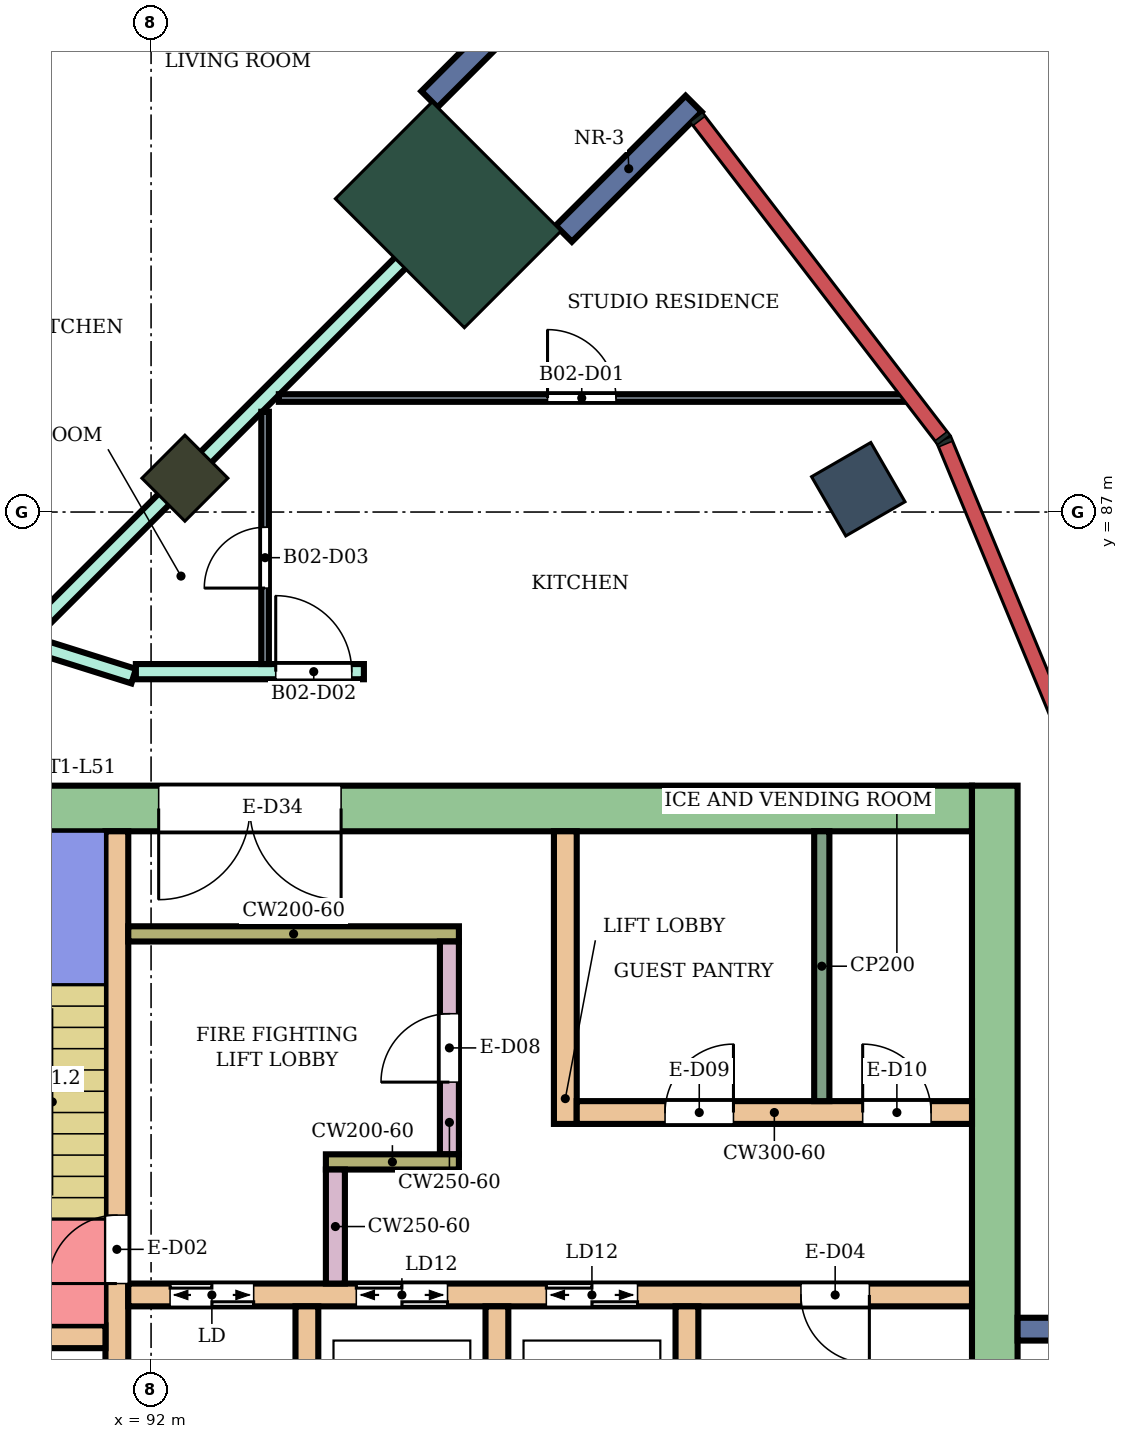
"""IFC4 building model, lengths in metres.
Left out: names, types, materials, properties, quantities, classifications, styles, units other than length and angle.
Written with IfcOpenShell. Run it as: python <this file> out.ifc"""

import sys

from ifc_helpers import new_model, si_unit, direction, frame, frame_2d, origin, origin_2d, place, context, subcontext, project, spatial, rectangle, extrude, element, fill, save


model = new_model("IFC4")
c1 = context("Model", 3, precision=1e-05, world=origin(), true_north=direction((0.0, 1.0)))
c2 = subcontext(c1, "Body", "Model", "MODEL_VIEW")
j1 = project(units=[si_unit("LENGTHUNIT", "METRE"), si_unit("PLANEANGLEUNIT", "RADIAN")], contexts=[c1])
p1 = place(None, origin())
s1 = spatial("IfcSite", under=j1, at=p1, CompositionType="ELEMENT")
p2 = place(p1, origin())
s2 = spatial("IfcBuilding", under=s1, at=p2, CompositionType="ELEMENT")
p3 = place(p2, frame((0.0, 0.0, 220.9)))
s3 = spatial("IfcBuildingStorey", under=s2, at=p3, CompositionType="ELEMENT", Elevation=220.9)
p4 = place(p3, frame((101.304, 87.3, 0.0), z_axis=(0.0, 0.0, 1.0), x_axis=(0.866025403784, 0.5, 0.0)))
e1 = element("IfcColumn", 1, at=p4, inside=s3, PredefinedType="COLUMN", context=c2, shape_type="SweptSolid", body=[
    extrude(rectangle(XDim=0.9, YDim=0.9, at=origin_2d()), origin(), (0.0, 0.0, 1.0), 4.2),
])
p5 = place(p3, frame((92.445, 87.445, 0.0), z_axis=(0.0, 0.0, 1.0), x_axis=(0.707106781187, 0.707106781187, 0.0)))
e2 = element("IfcColumn", 2, at=p5, inside=s3, PredefinedType="COLUMN", context=c2, shape_type="SweptSolid", body=[
    extrude(rectangle(XDim=0.8, YDim=0.8, at=origin_2d()), origin(), (0.0, 0.0, 1.0), 4.2),
])
p6 = place(p3, frame((95.91, 90.91, 0.0), z_axis=(0.0, 0.0, 1.0), x_axis=(0.707106781187, 0.707106781187, 0.0)))
e3 = element("IfcColumn", 3, at=p6, inside=s3, PredefinedType="COLUMN", context=c2, shape_type="SweptSolid", body=[
    extrude(rectangle(XDim=1.8, YDim=2.4, at=origin_2d()), origin(), (0.0, 0.0, 1.0), 4.2),
])
p7 = place(p3, frame((87.9, 83.1, 0.0), z_axis=(0.0, 0.0, 1.0), x_axis=(1.0, 0.0, 0.0)))
e4 = element("IfcWall", 4, at=p7, inside=s3, PredefinedType="SHEAR", context=c2, shape_type="SweptSolid", body=[
    extrude(rectangle(XDim=14.9, YDim=0.6, at=frame_2d((7.45, 0.0))), origin(), (0.0, 0.0, 1.0), 3.88),
])
p8 = place(p7, frame((4.2, 0.0, 0.0)))
e5 = element("IfcOpeningElement", 5, at=p8, cuts=e4, PredefinedType="OPENING", context=c2, shape_type="SweptSolid", body=[
    extrude(rectangle(XDim=2.4, YDim=2.4, at=frame_2d((1.2, 1.2))), frame((0.0, 0.31, 0.0), z_axis=(0.0, -1.0, 0.0), x_axis=(1.0, 0.0, 0.0)), (0.0, 0.0, 1.0), 0.62),
])
p9 = place(p3, frame((103.1, 66.6, 0.0), z_axis=(0.0, 0.0, 1.0), x_axis=(0.0, 1.0, 0.0)))
e6 = element("IfcWall", 6, at=p9, inside=s3, PredefinedType="SHEAR", context=c2, shape_type="SweptSolid", body=[
    extrude(rectangle(XDim=16.8, YDim=0.6, at=frame_2d((8.4, 0.0))), origin(), (0.0, 0.0, 1.0), 3.88),
])
p10 = place(p3, frame((91.55, 75.0, 0.0), z_axis=(0.0, 0.0, 1.0), x_axis=(0.0, 1.0, 0.0)))
e7 = element("IfcWall", 7, at=p10, inside=s3, PredefinedType="SHEAR", context=c2, shape_type="SweptSolid", body=[
    extrude(rectangle(XDim=7.8, YDim=0.3, at=frame_2d((3.9, 0.0))), origin(), (0.0, 0.0, 1.0), 3.88),
])
p11 = place(p10, frame((1.85, 0.0, 0.0)))
e8 = element("IfcOpeningElement", 8, at=p11, cuts=e7, PredefinedType="OPENING", context=c2, shape_type="SweptSolid", body=[
    extrude(rectangle(XDim=0.9, YDim=2.1, at=frame_2d((0.45, 1.05))), frame((0.0, 0.16, 0.0), z_axis=(0.0, -1.0, 0.0), x_axis=(1.0, 0.0, 0.0)), (0.0, 0.0, 1.0), 0.32),
])
p12 = place(p3, frame((88.35, 76.15, 0.0), z_axis=(0.0, 0.0, 1.0), x_axis=(1.0, 0.0, 0.0)))
e9 = element("IfcWall", 9, at=p12, inside=s3, PredefinedType="SHEAR", context=c2, shape_type="SweptSolid", body=[
    extrude(rectangle(XDim=3.05, YDim=0.3, at=frame_2d((1.525, 0.0))), origin(), (0.0, 0.0, 1.0), 3.88),
])
p13 = place(p12, frame((1.1, 0.0, 0.0)))
e10 = element("IfcOpeningElement", 10, at=p13, cuts=e9, PredefinedType="OPENING", context=c2, shape_type="SweptSolid", body=[
    extrude(rectangle(XDim=0.7, YDim=2.0, at=frame_2d((0.35, 1.0))), frame((0.0, 0.16, 0.0), z_axis=(0.0, -1.0, 0.0), x_axis=(1.0, 0.0, 0.0)), (0.0, 0.0, 1.0), 0.32),
])
p14 = place(p3, frame((91.7, 76.7, 0.0), z_axis=(0.0, 0.0, 1.0), x_axis=(1.0, 0.0, 0.0)))
e11 = element("IfcWall", 11, at=p14, inside=s3, PredefinedType="SHEAR", context=c2, shape_type="SweptSolid", body=[
    extrude(rectangle(XDim=11.1, YDim=0.3, at=frame_2d((5.55, 0.0))), origin(), (0.0, 0.0, 1.0), 3.88),
])
p15 = place(p14, frame((0.55, 0.0, 0.0)))
e12 = element("IfcOpeningElement", 12, at=p15, cuts=e11, PredefinedType="OPENING", context=c2, shape_type="SweptSolid", body=[
    extrude(rectangle(XDim=1.1, YDim=2.1, at=frame_2d((0.55, 1.05))), frame((0.0, 0.16, 0.0), z_axis=(0.0, -1.0, 0.0), x_axis=(1.0, 0.0, 0.0)), (0.0, 0.0, 1.0), 0.32),
])
p16 = place(p14, frame((3.0, 0.0, 0.0)))
e13 = element("IfcOpeningElement", 13, at=p16, cuts=e11, PredefinedType="OPENING", context=c2, shape_type="SweptSolid", body=[
    extrude(rectangle(XDim=1.2, YDim=2.1, at=frame_2d((0.6, 1.05))), frame((0.0, 0.16, 0.0), z_axis=(0.0, -1.0, 0.0), x_axis=(1.0, 0.0, 0.0)), (0.0, 0.0, 1.0), 0.32),
])
p17 = place(p14, frame((5.5, 0.0, 0.0)))
e14 = element("IfcOpeningElement", 14, at=p17, cuts=e11, PredefinedType="OPENING", context=c2, shape_type="SweptSolid", body=[
    extrude(rectangle(XDim=1.2, YDim=2.1, at=frame_2d((0.6, 1.05))), frame((0.0, 0.16, 0.0), z_axis=(0.0, -1.0, 0.0), x_axis=(1.0, 0.0, 0.0)), (0.0, 0.0, 1.0), 0.32),
])
p18 = place(p14, frame((8.85, 0.0, 0.0)))
e15 = element("IfcOpeningElement", 15, at=p18, cuts=e11, PredefinedType="OPENING", context=c2, shape_type="SweptSolid", body=[
    extrude(rectangle(XDim=0.9, YDim=2.1, at=frame_2d((0.45, 1.05))), frame((0.0, 0.16, 0.0), z_axis=(0.0, -1.0, 0.0), x_axis=(1.0, 0.0, 0.0)), (0.0, 0.0, 1.0), 0.32),
])
for number, where, z_axis, x_axis in (
    (16, (94.05, 74.0, 0.0), (0.0, 0.0, 1.0), (0.0, 1.0, 0.0)),
    (17, (96.55, 74.0, 0.0), (0.0, 0.0, 1.0), (0.0, 1.0, 0.0)),
    (18, (99.05, 74.0, 0.0), (0.0, 0.0, 1.0), (0.0, 1.0, 0.0)),
):
    element("IfcWall", number, at=place(p3, frame(where, z_axis=z_axis, x_axis=x_axis)), inside=s3, PredefinedType="SHEAR", context=c2, shape_type="SweptSolid", body=[
        extrude(rectangle(XDim=2.55, YDim=0.3, at=frame_2d((1.275, 0.0))), origin(), (0.0, 0.0, 1.0), 3.88),
    ])
p19 = place(p3, frame((91.7, 81.45, 0.0), z_axis=(0.0, 0.0, 1.0), x_axis=(1.0, 0.0, 0.0)))
e19 = element("IfcWall", 19, at=p19, inside=s3, PredefinedType="SHEAR", context=c2, shape_type="SweptSolid", body=[
    extrude(rectangle(XDim=4.35, YDim=0.2, at=frame_2d((2.175, 0.0))), origin(), (0.0, 0.0, 1.0), 3.88),
])
p20 = place(p3, frame((95.925, 78.55, 0.0), z_axis=(0.0, 0.0, 1.0), x_axis=(0.0, 1.0, 0.0)))
e20 = element("IfcWall", 20, at=p20, inside=s3, PredefinedType="SHEAR", context=c2, shape_type="SweptSolid", body=[
    extrude(rectangle(XDim=2.8, YDim=0.25, at=frame_2d((1.4, 0.0))), origin(), (0.0, 0.0, 1.0), 3.88),
])
p21 = place(p20, frame((0.95, 0.0, 0.0)))
e21 = element("IfcOpeningElement", 21, at=p21, cuts=e20, PredefinedType="OPENING", context=c2, shape_type="SweptSolid", body=[
    extrude(rectangle(XDim=0.9, YDim=2.1, at=frame_2d((0.45, 1.05))), frame((0.0, 0.135, 0.0), z_axis=(0.0, -1.0, 0.0), x_axis=(1.0, 0.0, 0.0)), (0.0, 0.0, 1.0), 0.27),
])
p22 = place(p3, frame((94.3, 78.45, 0.0), z_axis=(0.0, 0.0, 1.0), x_axis=(1.0, 0.0, 0.0)))
e22 = element("IfcWall", 22, at=p22, inside=s3, PredefinedType="SHEAR", context=c2, shape_type="SweptSolid", body=[
    extrude(rectangle(XDim=1.75, YDim=0.2, at=frame_2d((0.875, 0.0))), origin(), (0.0, 0.0, 1.0), 3.88),
])
p23 = place(p3, frame((94.425, 76.85, 0.0), z_axis=(0.0, 0.0, 1.0), x_axis=(0.0, 1.0, 0.0)))
e23 = element("IfcWall", 23, at=p23, inside=s3, PredefinedType="SHEAR", context=c2, shape_type="SweptSolid", body=[
    extrude(rectangle(XDim=1.5, YDim=0.25, at=frame_2d((0.75, 0.0))), origin(), (0.0, 0.0, 1.0), 3.88),
])
p24 = place(p3, frame((97.45, 78.95, 0.0), z_axis=(0.0, 0.0, 1.0), x_axis=(0.0, 1.0, 0.0)))
e24 = element("IfcWall", 24, at=p24, inside=s3, PredefinedType="SHEAR", context=c2, shape_type="SweptSolid", body=[
    extrude(rectangle(XDim=3.85, YDim=0.3, at=frame_2d((1.925, 0.0))), origin(), (0.0, 0.0, 1.0), 3.88),
])
p25 = place(p3, frame((97.6, 79.1, 0.0), z_axis=(0.0, 0.0, 1.0), x_axis=(1.0, 0.0, 0.0)))
e25 = element("IfcWall", 25, at=p25, inside=s3, PredefinedType="SHEAR", context=c2, shape_type="SweptSolid", body=[
    extrude(rectangle(XDim=5.2, YDim=0.3, at=frame_2d((2.6, 0.0))), origin(), (0.0, 0.0, 1.0), 3.88),
])
p26 = place(p25, frame((1.162, 0.0, 0.0)))
e26 = element("IfcOpeningElement", 26, at=p26, cuts=e25, PredefinedType="OPENING", context=c2, shape_type="SweptSolid", body=[
    extrude(rectangle(XDim=0.9, YDim=2.1, at=frame_2d((0.45, 1.05))), frame((0.0, 0.16, 0.0), z_axis=(0.0, -1.0, 0.0), x_axis=(1.0, 0.0, 0.0)), (0.0, 0.0, 1.0), 0.32),
])
p27 = place(p25, frame((3.762, 0.0, 0.0)))
e27 = element("IfcOpeningElement", 27, at=p27, cuts=e25, PredefinedType="OPENING", context=c2, shape_type="SweptSolid", body=[
    extrude(rectangle(XDim=0.9, YDim=2.1, at=frame_2d((0.45, 1.05))), frame((0.0, 0.16, 0.0), z_axis=(0.0, -1.0, 0.0), x_axis=(1.0, 0.0, 0.0)), (0.0, 0.0, 1.0), 0.32),
])
for number, where, z_axis, x_axis in (
    (28, (103.4, 76.25, 0.0), (0.0, 0.0, 1.0), (1.0, 0.0, 0.0)),
    (29, (97.43, 90.662, 0.0), (0.0, 0.0, 1.0), (0.707, 0.707, 0.0)),
    (30, (95.662, 92.43, 0.0), (0.0, 0.0, 1.0), (0.707, 0.707, 0.0)),
):
    element("IfcWall", number, at=place(p3, frame(where, z_axis=z_axis, x_axis=x_axis)), inside=s3, PredefinedType="NOTDEFINED", context=c2, shape_type="SweptSolid", body=[
        extrude(rectangle(XDim=2.416, YDim=0.3, at=frame_2d((1.208, 0.0))), origin(), (0.0, 0.0, 1.0), 4.2),
    ])
p28 = place(p3, frame((86.313, 86.554, 0.0), z_axis=(0.0, 0.0, 1.0), x_axis=(0.954081217458, -0.299548043717, 0.0)))
e31 = element("IfcWall", 31, at=p28, inside=s3, PredefinedType="PARTITIONING", context=c2, shape_type="SweptSolid", body=[
    extrude(rectangle(XDim=5.721, YDim=0.2, at=frame_2d((2.86, 0.0))), origin(), (0.0, 0.0, 1.0), 3.75),
])
p29 = place(p28, frame((0.848, 0.0, 0.0)))
e32 = element("IfcOpeningElement", 32, at=p29, cuts=e31, PredefinedType="OPENING", context=c2, shape_type="SweptSolid", body=[
    extrude(rectangle(XDim=1.0, YDim=2.1, at=frame_2d((0.5, 1.05))), frame((0.0, 0.11, 0.0), z_axis=(0.0, -1.0, 0.0), x_axis=(1.0, 0.0, 0.0)), (0.0, 0.0, 1.0), 0.22),
])
p30 = place(p3, frame((90.416, 85.416, 0.0), z_axis=(0.0, 0.0, 1.0), x_axis=(0.707222076599, 0.706991466971, 0.0)))
e33 = element("IfcWall", 33, at=p30, inside=s3, PredefinedType="PARTITIONING", context=c2, shape_type="SweptSolid", body=[
    extrude(rectangle(XDim=8.469, YDim=0.2, at=frame_2d((4.235, 0.0))), origin(), (0.0, 0.0, 1.0), 3.75),
])
p31 = place(p3, frame((91.8, 84.9, 0.0), z_axis=(0.0, 0.0, 1.0), x_axis=(1.0, 0.0, 0.0)))
e34 = element("IfcWall", 34, at=p31, inside=s3, PredefinedType="PARTITIONING", context=c2, shape_type="SweptSolid", body=[
    extrude(rectangle(XDim=3.0, YDim=0.2, at=frame_2d((1.5, 0.0))), origin(), (0.0, 0.0, 1.0), 3.75),
])
p32 = place(p31, frame((1.84, 0.0, 0.0)))
e35 = element("IfcOpeningElement", 35, at=p32, cuts=e34, PredefinedType="OPENING", context=c2, shape_type="SweptSolid", body=[
    extrude(rectangle(XDim=1.0, YDim=2.1, at=frame_2d((0.5, 1.05))), frame((0.0, 0.11, 0.0), z_axis=(0.0, -1.0, 0.0), x_axis=(1.0, 0.0, 0.0)), (0.0, 0.0, 1.0), 0.22),
])
p33 = place(p3, frame((86.671, 86.554, 0.0), z_axis=(0.0, 0.0, 1.0), x_axis=(0.500104188531, 0.865965242151, 0.0)))
e36 = element("IfcWall", 36, at=p33, inside=s3, PredefinedType="PARTITIONING", context=c2, shape_type="SweptSolid", body=[
    extrude(rectangle(XDim=12.456, YDim=0.1, at=frame_2d((6.228, 0.0))), origin(), (0.0, 0.0, 1.0), 3.75),
])
p34 = place(p33, frame((9.111, 0.0, 0.0)))
e37 = element("IfcOpeningElement", 37, at=p34, cuts=e36, PredefinedType="OPENING", context=c2, shape_type="SweptSolid", body=[
    extrude(rectangle(XDim=0.9, YDim=2.1, at=frame_2d((0.45, 1.05))), frame((0.0, 0.06, 0.0), z_axis=(0.0, -1.0, 0.0), x_axis=(1.0, 0.0, 0.0)), (0.0, 0.0, 1.0), 0.12),
])
p35 = place(p33, frame((2.462, 0.0, 0.0)))
e38 = element("IfcOpeningElement", 38, at=p35, cuts=e36, PredefinedType="OPENING", context=c2, shape_type="SweptSolid", body=[
    extrude(rectangle(XDim=0.8, YDim=2.1, at=frame_2d((0.4, 1.05))), frame((0.0, 0.06, 0.0), z_axis=(0.0, -1.0, 0.0), x_axis=(1.0, 0.0, 0.0)), (0.0, 0.0, 1.0), 0.12),
])
p36 = place(p3, frame((93.5, 85.0, 0.0), z_axis=(0.0, 0.0, 1.0), x_axis=(0.0, 1.0, 0.0)))
e39 = element("IfcWall", 39, at=p36, inside=s3, PredefinedType="PARTITIONING", context=c2, shape_type="SweptSolid", body=[
    extrude(rectangle(XDim=3.319, YDim=0.1, at=frame_2d((1.66, 0.0))), origin(), (0.0, 0.0, 1.0), 3.75),
])
p37 = place(p36, frame((1.0, 0.0, 0.0)))
e40 = element("IfcOpeningElement", 40, at=p37, cuts=e39, PredefinedType="OPENING", context=c2, shape_type="SweptSolid", body=[
    extrude(rectangle(XDim=0.8, YDim=2.1, at=frame_2d((0.4, 1.05))), frame((0.0, 0.06, 0.0), z_axis=(0.0, -1.0, 0.0), x_axis=(1.0, 0.0, 0.0)), (0.0, 0.0, 1.0), 0.12),
])
p38 = place(p3, frame((93.681, 88.5, 0.0), z_axis=(0.0, 0.0, 1.0), x_axis=(1.0, 0.0, 0.0)))
e41 = element("IfcWall", 41, at=p38, inside=s3, PredefinedType="PARTITIONING", context=c2, shape_type="SweptSolid", body=[
    extrude(rectangle(XDim=8.247, YDim=0.1, at=frame_2d((4.124, 0.0))), origin(), (0.0, 0.0, 1.0), 3.75),
])
p39 = place(p38, frame((3.535, 0.0, 0.0)))
e42 = element("IfcOpeningElement", 42, at=p39, cuts=e41, PredefinedType="OPENING", context=c2, shape_type="SweptSolid", body=[
    extrude(rectangle(XDim=0.9, YDim=2.1, at=frame_2d((0.45, 1.05))), frame((0.0, 0.06, 0.0), z_axis=(0.0, -1.0, 0.0), x_axis=(1.0, 0.0, 0.0)), (0.0, 0.0, 1.0), 0.12),
])
p40 = place(p3, frame((100.824, 79.25, 0.0), z_axis=(0.0, 0.0, 1.0), x_axis=(0.0, 1.0, 0.0)))
e43 = element("IfcWall", 43, at=p40, inside=s3, PredefinedType="PARTITIONING", context=c2, shape_type="SweptSolid", body=[
    extrude(rectangle(XDim=3.55, YDim=0.2, at=frame_2d((1.775, 0.0))), origin(), (0.0, 0.0, 1.0), 3.88),
])
p41 = place(p39, origin())
e44 = element("IfcDoor", 44, at=p41, inside=s3, OperationType="SINGLE_SWING_LEFT", PredefinedType="DOOR", context=c2, shape_type="SweptSolid", body=[
    extrude(rectangle(XDim=0.9, YDim=2.1, at=frame_2d((0.45, 1.05))), frame((0.0, 0.025, 0.0), z_axis=(0.0, -1.0, 0.0), x_axis=(1.0, 0.0, 0.0)), (0.0, 0.0, 1.0), 0.05),
])
fill(e42, e44)
p42 = place(p32, origin())
e45 = element("IfcDoor", 45, at=p42, inside=s3, OperationType="SINGLE_SWING_LEFT", PredefinedType="DOOR", context=c2, shape_type="SweptSolid", body=[
    extrude(rectangle(XDim=1.0, YDim=2.1, at=frame_2d((0.5, 1.05))), frame((0.0, 0.025, 0.0), z_axis=(0.0, -1.0, 0.0), x_axis=(1.0, 0.0, 0.0)), (0.0, 0.0, 1.0), 0.05),
])
fill(e35, e45)
p43 = place(p37, origin())
e46 = element("IfcDoor", 46, at=p43, inside=s3, OperationType="SINGLE_SWING_LEFT", PredefinedType="DOOR", context=c2, shape_type="SweptSolid", body=[
    extrude(rectangle(XDim=0.8, YDim=2.1, at=frame_2d((0.4, 1.05))), frame((0.0, 0.025, 0.0), z_axis=(0.0, -1.0, 0.0), x_axis=(1.0, 0.0, 0.0)), (0.0, 0.0, 1.0), 0.05),
])
fill(e40, e46)
p44 = place(p11, origin())
e47 = element("IfcDoor", 47, at=p44, inside=s3, OperationType="SINGLE_SWING_LEFT", PredefinedType="DOOR", context=c2, shape_type="SweptSolid", body=[
    extrude(rectangle(XDim=0.9, YDim=2.1, at=frame_2d((0.45, 1.05))), frame((0.0, 0.025, 0.0), z_axis=(0.0, -1.0, 0.0), x_axis=(1.0, 0.0, 0.0)), (0.0, 0.0, 1.0), 0.05),
])
fill(e8, e47)
p45 = place(p15, origin())
e48 = element("IfcDoor", 48, at=p45, inside=s3, OperationType="DOUBLE_DOOR_SLIDING", PredefinedType="DOOR", context=c2, shape_type="SweptSolid", body=[
    extrude(rectangle(XDim=1.1, YDim=2.1, at=frame_2d((0.55, 1.05))), frame((0.0, 0.025, 0.0), z_axis=(0.0, -1.0, 0.0), x_axis=(1.0, 0.0, 0.0)), (0.0, 0.0, 1.0), 0.05),
])
fill(e12, e48)
p46 = place(p16, origin())
e49 = element("IfcDoor", 49, at=p46, inside=s3, OperationType="DOUBLE_DOOR_SLIDING", PredefinedType="DOOR", context=c2, shape_type="SweptSolid", body=[
    extrude(rectangle(XDim=1.2, YDim=2.1, at=frame_2d((0.6, 1.05))), frame((0.0, 0.025, 0.0), z_axis=(0.0, -1.0, 0.0), x_axis=(1.0, 0.0, 0.0)), (0.0, 0.0, 1.0), 0.05),
])
fill(e13, e49)
p47 = place(p17, origin())
e50 = element("IfcDoor", 50, at=p47, inside=s3, OperationType="DOUBLE_DOOR_SLIDING", PredefinedType="DOOR", context=c2, shape_type="SweptSolid", body=[
    extrude(rectangle(XDim=1.2, YDim=2.1, at=frame_2d((0.6, 1.05))), frame((0.0, 0.025, 0.0), z_axis=(0.0, -1.0, 0.0), x_axis=(1.0, 0.0, 0.0)), (0.0, 0.0, 1.0), 0.05),
])
fill(e14, e50)
p48 = place(p18, frame((0.9, 0.0, 0.0), z_axis=(0.0, 0.0, 1.0), x_axis=(-1.0, 0.0, 0.0)))
e51 = element("IfcDoor", 51, at=p48, inside=s3, OperationType="SINGLE_SWING_LEFT", PredefinedType="DOOR", context=c2, shape_type="SweptSolid", body=[
    extrude(rectangle(XDim=0.9, YDim=2.1, at=frame_2d((0.45, 1.05))), frame((0.0, 0.025, 0.0), z_axis=(0.0, -1.0, 0.0), x_axis=(1.0, 0.0, 0.0)), (0.0, 0.0, 1.0), 0.05),
])
fill(e15, e51)
p49 = place(p21, origin())
e52 = element("IfcDoor", 52, at=p49, inside=s3, OperationType="SINGLE_SWING_LEFT", PredefinedType="DOOR", context=c2, shape_type="SweptSolid", body=[
    extrude(rectangle(XDim=0.9, YDim=2.1, at=frame_2d((0.45, 1.05))), frame((0.0, 0.025, 0.0), z_axis=(0.0, -1.0, 0.0), x_axis=(1.0, 0.0, 0.0)), (0.0, 0.0, 1.0), 0.05),
])
fill(e21, e52)
p50 = place(p26, origin())
e53 = element("IfcDoor", 53, at=p50, inside=s3, OperationType="SINGLE_SWING_RIGHT", PredefinedType="DOOR", context=c2, shape_type="SweptSolid", body=[
    extrude(rectangle(XDim=0.9, YDim=2.1, at=frame_2d((0.45, 1.05))), frame((0.0, 0.025, 0.0), z_axis=(0.0, -1.0, 0.0), x_axis=(1.0, 0.0, 0.0)), (0.0, 0.0, 1.0), 0.05),
])
fill(e26, e53)
p51 = place(p27, origin())
e54 = element("IfcDoor", 54, at=p51, inside=s3, OperationType="SINGLE_SWING_LEFT", PredefinedType="DOOR", context=c2, shape_type="SweptSolid", body=[
    extrude(rectangle(XDim=0.9, YDim=2.1, at=frame_2d((0.45, 1.05))), frame((0.0, 0.025, 0.0), z_axis=(0.0, -1.0, 0.0), x_axis=(1.0, 0.0, 0.0)), (0.0, 0.0, 1.0), 0.05),
])
fill(e27, e54)
p52 = place(p8, frame((2.4, 0.0, 0.0), z_axis=(0.0, 0.0, 1.0), x_axis=(-1.0, 0.0, 0.0)))
e55 = element("IfcDoor", 55, at=p52, inside=s3, OperationType="DOUBLE_DOOR_SINGLE_SWING", PredefinedType="DOOR", context=c2, shape_type="SweptSolid", body=[
    extrude(rectangle(XDim=2.4, YDim=2.4, at=frame_2d((1.2, 1.2))), frame((0.0, 0.025, 0.0), z_axis=(0.0, -1.0, 0.0), x_axis=(1.0, 0.0, 0.0)), (0.0, 0.0, 1.0), 0.05),
])
fill(e5, e55)
save(model, sys.argv[1])
